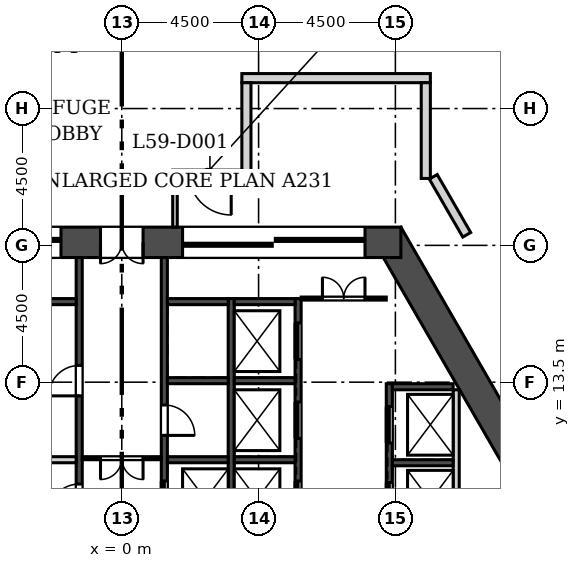
"""IFC4 building model, lengths in metres.
Left out: names, types, materials, properties, quantities, classifications, styles, units other than length and angle.
Written with IfcOpenShell. Run it as: python <this file> out.ifc"""

import sys

from ifc_helpers import new_model, si_unit, direction, frame, frame_2d, origin, place, context, subcontext, project, spatial, rectangle, extrude, element, fill, save


model = new_model("IFC4")
c1 = context("Model", 3, precision=1e-05, world=origin(), true_north=direction((0.0, 1.0)))
c2 = subcontext(c1, "Body", "Model", "MODEL_VIEW")
j1 = project(units=[si_unit("LENGTHUNIT", "METRE"), si_unit("PLANEANGLEUNIT", "RADIAN")], contexts=[c1])
p1 = place(None, origin())
s1 = spatial("IfcSite", under=j1, at=p1, CompositionType="ELEMENT")
p2 = place(p1, origin())
s2 = spatial("IfcBuilding", under=s1, at=p2, CompositionType="ELEMENT")
p3 = place(p2, frame((0.0, 0.0, 259.5)))
s3 = spatial("IfcBuildingStorey", under=s2, at=p3, CompositionType="ELEMENT", Elevation=259.5)
p4 = place(p3, frame((13.167, 10.695, 0.0), z_axis=(0.0, 0.0, 1.0), x_axis=(-0.499995021168, 0.866028278295, 0.0)))
e1 = element("IfcWall", 1, at=p4, inside=s3, PredefinedType="SHEAR", context=c2, shape_type="SweptSolid", body=[
    extrude(rectangle(XDim=8.839, YDim=1.0, at=frame_2d((4.419, 0.0))), origin(), (0.0, 0.0, 1.0), 7.2),
])
p5 = place(p3, frame((9.181, 18.1, 0.0), z_axis=(0.0, 0.0, 1.0), x_axis=(-1.0, 0.0, 0.0)))
e2 = element("IfcWall", 2, at=p5, inside=s3, PredefinedType="SHEAR", context=c2, shape_type="SweptSolid", body=[
    extrude(rectangle(XDim=18.361, YDim=1.0, at=frame_2d((9.181, 0.0))), origin(), (0.0, 0.0, 1.0), 7.2),
])
p6 = place(p5, frame((8.481, 0.0, 0.0)))
e3 = element("IfcOpeningElement", 3, at=p6, cuts=e2, PredefinedType="OPENING", context=c2, shape_type="SweptSolid", body=[
    extrude(rectangle(XDim=1.4, YDim=2.1, at=frame_2d((0.7, 1.05))), frame((0.0, 0.51, 0.0), z_axis=(0.0, -1.0, 0.0), x_axis=(1.0, 0.0, 0.0)), (0.0, 0.0, 1.0), 1.02),
])
p7 = place(p5, frame((11.181, 0.0, 0.0)))
e4 = element("IfcOpeningElement", 4, at=p7, cuts=e2, PredefinedType="OPENING", context=c2, shape_type="SweptSolid", body=[
    extrude(rectangle(XDim=6.0, YDim=2.4, at=frame_2d((3.0, 1.2))), frame((0.0, 0.51, 0.0), z_axis=(0.0, -1.0, 0.0), x_axis=(1.0, 0.0, 0.0)), (0.0, 0.0, 1.0), 1.02),
])
p8 = place(p5, frame((1.181, 0.0, 0.0)))
e5 = element("IfcOpeningElement", 5, at=p8, cuts=e2, PredefinedType="OPENING", context=c2, shape_type="SweptSolid", body=[
    extrude(rectangle(XDim=6.0, YDim=2.4, at=frame_2d((3.0, 1.2))), frame((0.0, 0.51, 0.0), z_axis=(0.0, -1.0, 0.0), x_axis=(1.0, 0.0, 0.0)), (0.0, 0.0, 1.0), 1.02),
])
p9 = place(p3, frame((26.022, 7.709, 0.0), z_axis=(0.0, 0.0, 1.0), x_axis=(-0.500000891752, 0.866024888931, 0.0)))
e6 = element("IfcWall", 6, at=p9, inside=s3, PredefinedType="SOLIDWALL", context=c2, shape_type="SweptSolid", body=[
    extrude(rectangle(XDim=43.339, YDim=0.34, at=frame_2d((21.669, 0.0))), origin(), (0.0, 0.0, 1.0), 6.8),
])
p10 = place(p9, frame((19.335, 0.0, 0.9)))
e7 = element("IfcOpeningElement", 7, at=p10, cuts=e6, PredefinedType="OPENING", context=c2, shape_type="SweptSolid", body=[
    extrude(rectangle(XDim=1.885, YDim=3.0, at=frame_2d((0.942, 1.5))), frame((0.0, 0.18, 0.0), z_axis=(0.0, -1.0, 0.0), x_axis=(1.0, 0.0, 0.0)), (0.0, 0.0, 1.0), 0.36),
])
p11 = place(p9, frame((34.335, 0.0, 0.9)))
e8 = element("IfcOpeningElement", 8, at=p11, cuts=e6, PredefinedType="OPENING", context=c2, shape_type="SweptSolid", body=[
    extrude(rectangle(XDim=1.885, YDim=3.0, at=frame_2d((0.942, 1.5))), frame((0.0, 0.18, 0.0), z_axis=(0.0, -1.0, 0.0), x_axis=(1.0, 0.0, 0.0)), (0.0, 0.0, 1.0), 0.36),
])
p12 = place(p9, frame((40.335, 0.0, 0.9)))
e9 = element("IfcOpeningElement", 9, at=p12, cuts=e6, PredefinedType="OPENING", context=c2, shape_type="SweptSolid", body=[
    extrude(rectangle(XDim=1.885, YDim=3.0, at=frame_2d((0.942, 1.5))), frame((0.0, 0.18, 0.0), z_axis=(0.0, -1.0, 0.0), x_axis=(1.0, 0.0, 0.0)), (0.0, 0.0, 1.0), 0.36),
])
p13 = place(p3, frame((11.0, 5.85, 0.0), z_axis=(0.0, 0.0, 1.0), x_axis=(0.0, 1.0, 0.0)))
e10 = element("IfcWall", 10, at=p13, inside=s3, PredefinedType="SOLIDWALL", context=c2, shape_type="SweptSolid", body=[
    extrude(rectangle(XDim=7.4, YDim=0.2, at=frame_2d((3.7, 0.0))), origin(), (0.0, 0.0, 1.0), 6.8),
])
p14 = place(p3, frame((8.8, 8.25, -0.4), z_axis=(0.0, 0.0, 1.0), x_axis=(0.0, 1.0, 0.0)))
e11 = element("IfcWall", 11, at=p14, inside=s3, PredefinedType="SOLIDWALL", context=c2, shape_type="SweptSolid", body=[
    extrude(rectangle(XDim=5.2, YDim=0.2, at=frame_2d((2.6, 0.0))), origin(), (0.0, 0.0, 1.0), 7.2),
])
p15 = place(p14, frame((0.75, 0.0, 0.4)))
e12 = element("IfcOpeningElement", 12, at=p15, cuts=e11, PredefinedType="OPENING", context=c2, shape_type="SweptSolid", body=[
    extrude(rectangle(XDim=1.2, YDim=2.1, at=frame_2d((0.6, 1.05))), frame((0.0, 0.11, 0.0), z_axis=(0.0, -1.0, 0.0), x_axis=(1.0, 0.0, 0.0)), (0.0, 0.0, 1.0), 0.22),
])
p16 = place(p14, frame((3.25, 0.0, 0.4)))
e13 = element("IfcOpeningElement", 13, at=p16, cuts=e11, PredefinedType="OPENING", context=c2, shape_type="SweptSolid", body=[
    extrude(rectangle(XDim=1.2, YDim=2.1, at=frame_2d((0.6, 1.05))), frame((0.0, 0.11, 0.0), z_axis=(0.0, -1.0, 0.0), x_axis=(1.0, 0.0, 0.0)), (0.0, 0.0, 1.0), 0.22),
])
p17 = place(p3, frame((5.8, 8.25, -0.4), z_axis=(0.0, 0.0, 1.0), x_axis=(0.0, 1.0, 0.0)))
e14 = element("IfcWall", 14, at=p17, inside=s3, PredefinedType="SOLIDWALL", context=c2, shape_type="SweptSolid", body=[
    extrude(rectangle(XDim=8.0, YDim=0.2, at=frame_2d((4.0, 0.0))), origin(), (0.0, 0.0, 1.0), 7.2),
])
p18 = place(p17, frame((0.8, 0.0, 0.4)))
e15 = element("IfcOpeningElement", 15, at=p18, cuts=e14, PredefinedType="OPENING", context=c2, shape_type="SweptSolid", body=[
    extrude(rectangle(XDim=1.2, YDim=2.1, at=frame_2d((0.6, 1.05))), frame((0.0, 0.11, 0.0), z_axis=(0.0, -1.0, 0.0), x_axis=(1.0, 0.0, 0.0)), (0.0, 0.0, 1.0), 0.22),
])
p19 = place(p17, frame((3.4, 0.0, 0.4)))
e16 = element("IfcOpeningElement", 16, at=p19, cuts=e14, PredefinedType="OPENING", context=c2, shape_type="SweptSolid", body=[
    extrude(rectangle(XDim=1.2, YDim=2.1, at=frame_2d((0.6, 1.05))), frame((0.0, 0.11, 0.0), z_axis=(0.0, -1.0, 0.0), x_axis=(1.0, 0.0, 0.0)), (0.0, 0.0, 1.0), 0.22),
])
p20 = place(p17, frame((6.0, 0.0, 0.4)))
e17 = element("IfcOpeningElement", 17, at=p20, cuts=e14, PredefinedType="OPENING", context=c2, shape_type="SweptSolid", body=[
    extrude(rectangle(XDim=1.2, YDim=2.1, at=frame_2d((0.6, 1.05))), frame((0.0, 0.11, 0.0), z_axis=(0.0, -1.0, 0.0), x_axis=(1.0, 0.0, 0.0)), (0.0, 0.0, 1.0), 0.22),
])
p21 = place(p3, frame((3.6, 8.45, -0.4), z_axis=(0.0, 0.0, 1.0), x_axis=(0.0, 1.0, 0.0)))
e18 = element("IfcWall", 18, at=p21, inside=s3, PredefinedType="SOLIDWALL", context=c2, shape_type="SweptSolid", body=[
    extrude(rectangle(XDim=7.8, YDim=0.2, at=frame_2d((3.9, 0.0))), origin(), (0.0, 0.0, 1.0), 7.2),
])
p22 = place(p3, frame((-1.4, 5.85, -0.4), z_axis=(0.0, 0.0, 1.0), x_axis=(0.0, 1.0, 0.0)))
e19 = element("IfcWall", 19, at=p22, inside=s3, PredefinedType="SOLIDWALL", context=c2, shape_type="SweptSolid", body=[
    extrude(rectangle(XDim=11.75, YDim=0.2, at=frame_2d((5.875, 0.0))), origin(), (0.0, 0.0, 1.0), 7.2),
])
p23 = place(p22, frame((0.65, 0.0, 0.4)))
e20 = element("IfcOpeningElement", 20, at=p23, cuts=e19, PredefinedType="OPENING", context=c2, shape_type="SweptSolid", body=[
    extrude(rectangle(XDim=1.1, YDim=2.1, at=frame_2d((0.55, 1.05))), frame((0.0, 0.11, 0.0), z_axis=(0.0, -1.0, 0.0), x_axis=(1.0, 0.0, 0.0)), (0.0, 0.0, 1.0), 0.22),
])
p24 = place(p22, frame((3.3, 0.0, 0.4)))
e21 = element("IfcOpeningElement", 21, at=p24, cuts=e19, PredefinedType="OPENING", context=c2, shape_type="SweptSolid", body=[
    extrude(rectangle(XDim=1.0, YDim=2.1, at=frame_2d((0.5, 1.05))), frame((0.0, 0.11, 0.0), z_axis=(0.0, -1.0, 0.0), x_axis=(1.0, 0.0, 0.0)), (0.0, 0.0, 1.0), 0.22),
])
p25 = place(p22, frame((7.2, 0.0, 0.4)))
e22 = element("IfcOpeningElement", 22, at=p25, cuts=e19, PredefinedType="OPENING", context=c2, shape_type="SweptSolid", body=[
    extrude(rectangle(XDim=1.0, YDim=2.1, at=frame_2d((0.5, 1.05))), frame((0.0, 0.11, 0.0), z_axis=(0.0, -1.0, 0.0), x_axis=(1.0, 0.0, 0.0)), (0.0, 0.0, 1.0), 0.22),
])
p26 = place(p3, frame((1.4, 5.85, -0.4), z_axis=(0.0, 0.0, 1.0), x_axis=(0.0, 1.0, 0.0)))
e23 = element("IfcWall", 23, at=p26, inside=s3, PredefinedType="SOLIDWALL", context=c2, shape_type="SweptSolid", body=[
    extrude(rectangle(XDim=11.75, YDim=0.2, at=frame_2d((5.875, 0.0))), origin(), (0.0, 0.0, 1.0), 7.2),
])
p27 = place(p26, frame((3.2, 0.0, 0.4)))
e24 = element("IfcOpeningElement", 24, at=p27, cuts=e23, PredefinedType="OPENING", context=c2, shape_type="SweptSolid", body=[
    extrude(rectangle(XDim=1.2, YDim=2.1, at=frame_2d((0.6, 1.05))), frame((0.0, 0.11, 0.0), z_axis=(0.0, -1.0, 0.0), x_axis=(1.0, 0.0, 0.0)), (0.0, 0.0, 1.0), 0.22),
])
p28 = place(p26, frame((0.65, 0.0, 0.4)))
e25 = element("IfcOpeningElement", 25, at=p28, cuts=e23, PredefinedType="OPENING", context=c2, shape_type="SweptSolid", body=[
    extrude(rectangle(XDim=1.1, YDim=2.1, at=frame_2d((0.55, 1.05))), frame((0.0, 0.11, 0.0), z_axis=(0.0, -1.0, 0.0), x_axis=(1.0, 0.0, 0.0)), (0.0, 0.0, 1.0), 0.22),
])
p29 = place(p26, frame((5.9, 0.0, 0.4)))
e26 = element("IfcOpeningElement", 26, at=p29, cuts=e23, PredefinedType="OPENING", context=c2, shape_type="SweptSolid", body=[
    extrude(rectangle(XDim=1.0, YDim=2.1, at=frame_2d((0.5, 1.05))), frame((0.0, 0.11, 0.0), z_axis=(0.0, -1.0, 0.0), x_axis=(1.0, 0.0, 0.0)), (0.0, 0.0, 1.0), 0.22),
])
p30 = place(p3, frame((-3.5, 10.95, 0.0), z_axis=(0.0, 0.0, 1.0), x_axis=(1.0, 0.0, 0.0)))
e27 = element("IfcWall", 27, at=p30, inside=s3, PredefinedType="SOLIDWALL", context=c2, shape_type="SweptSolid", body=[
    extrude(rectangle(XDim=2.0, YDim=0.2, at=frame_2d((1.0, 0.0))), origin(), (0.0, 0.0, 1.0), 6.8),
])
for number, where, z_axis, x_axis in (
    (28, (-3.5, 16.15, -0.4), (0.0, 0.0, 1.0), (1.0, 0.0, 0.0)),
    (29, (8.9, 10.85, -0.4), (0.0, 0.0, 1.0), (1.0, 0.0, 0.0)),
    (30, (8.9, 13.35, -0.4), (0.0, 0.0, 1.0), (1.0, 0.0, 0.0)),
    (31, (3.7, 10.95, -0.4), (0.0, 0.0, 1.0), (1.0, 0.0, 0.0)),
    (32, (3.7, 13.55, -0.4), (0.0, 0.0, 1.0), (1.0, 0.0, 0.0)),
    (33, (3.7, 16.15, -0.4), (0.0, 0.0, 1.0), (1.0, 0.0, 0.0)),
    (34, (1.5, 10.95, -0.4), (0.0, 0.0, 1.0), (1.0, 0.0, 0.0)),
    (35, (1.5, 13.55, -0.4), (0.0, 0.0, 1.0), (1.0, 0.0, 0.0)),
    (36, (1.5, 16.15, -0.4), (0.0, 0.0, 1.0), (1.0, 0.0, 0.0)),
):
    element("IfcWall", number, at=place(p3, frame(where, z_axis=z_axis, x_axis=x_axis)), inside=s3, PredefinedType="SOLIDWALL", context=c2, shape_type="SweptSolid", body=[
        extrude(rectangle(XDim=2.0, YDim=0.2, at=frame_2d((1.0, 0.0))), origin(), (0.0, 0.0, 1.0), 7.2),
    ])
p31 = place(p3, frame((5.9, 16.25, 0.0), z_axis=(0.0, 0.0, 1.0), x_axis=(1.0, 0.0, 0.0)))
e37 = element("IfcWall", 37, at=p31, inside=s3, PredefinedType="PARTITIONING", context=c2, shape_type="SweptSolid", body=[
    extrude(rectangle(XDim=2.8, YDim=0.1, at=frame_2d((1.4, 0.0))), origin(), (0.0, 0.0, 1.0), 6.8),
])
p32 = place(p31, frame((0.7, 0.0, 0.0)))
e38 = element("IfcOpeningElement", 38, at=p32, cuts=e37, PredefinedType="OPENING", context=c2, shape_type="SweptSolid", body=[
    extrude(rectangle(XDim=1.4, YDim=2.1, at=frame_2d((0.7, 1.05))), frame((0.0, 0.06, 0.0), z_axis=(0.0, -1.0, 0.0), x_axis=(1.0, 0.0, 0.0)), (0.0, 0.0, 1.0), 0.12),
])
p33 = place(p3, frame((-1.3, 11.0, 0.0), z_axis=(0.0, 0.0, 1.0), x_axis=(1.0, 0.0, 0.0)))
e39 = element("IfcWall", 39, at=p33, inside=s3, PredefinedType="PARTITIONING", context=c2, shape_type="SweptSolid", body=[
    extrude(rectangle(XDim=2.6, YDim=0.1, at=frame_2d((1.3, 0.0))), origin(), (0.0, 0.0, 1.0), 6.8),
])
p34 = place(p33, frame((0.6, 0.0, 0.0)))
e40 = element("IfcOpeningElement", 40, at=p34, cuts=e39, PredefinedType="OPENING", context=c2, shape_type="SweptSolid", body=[
    extrude(rectangle(XDim=1.4, YDim=2.1, at=frame_2d((0.7, 1.05))), frame((0.0, 0.06, 0.0), z_axis=(0.0, -1.0, 0.0), x_axis=(1.0, 0.0, 0.0)), (0.0, 0.0, 1.0), 0.12),
])
p35 = place(p3, frame((3.95, 23.5, 0.0), z_axis=(0.0, 0.0, 1.0), x_axis=(1.0, 0.0, 0.0)))
e41 = element("IfcWall", 41, at=p35, inside=s3, PredefinedType="SOLIDWALL", context=c2, shape_type="SweptSolid", body=[
    extrude(rectangle(XDim=6.2, YDim=0.3, at=frame_2d((3.1, 0.0))), origin(), (0.0, 0.0, 1.0), 6.8),
])
p36 = place(p3, frame((4.1, 20.2, 0.0), z_axis=(0.0, 0.0, 1.0), x_axis=(7.7513371e-05, 0.999999996996, 0.0)))
e42 = element("IfcWall", 42, at=p36, inside=s3, PredefinedType="SOLIDWALL", context=c2, shape_type="SweptSolid", body=[
    extrude(rectangle(XDim=3.15, YDim=0.3, at=frame_2d((1.575, 0.0))), origin(), (0.0, 0.0, 1.0), 6.8),
])
p37 = place(p3, frame((10.0, 23.35, 0.0), z_axis=(0.0, 0.0, 1.0), x_axis=(0.0, -1.0, 0.0)))
e43 = element("IfcWall", 43, at=p37, inside=s3, PredefinedType="SOLIDWALL", context=c2, shape_type="SweptSolid", body=[
    extrude(rectangle(XDim=3.149, YDim=0.3, at=frame_2d((1.575, 0.0))), origin(), (0.0, 0.0, 1.0), 6.8),
])
p38 = place(p3, frame((1.675, 20.4, 0.0), z_axis=(0.0, 0.0, 1.0), x_axis=(1.0, 0.0, 0.0)))
e44 = element("IfcWall", 44, at=p38, inside=s3, PredefinedType="PARTITIONING", context=c2, shape_type="SweptSolid", body=[
    extrude(rectangle(XDim=2.275, YDim=0.15, at=frame_2d((1.137, 0.0))), origin(), (0.0, 0.0, 1.0), 6.8),
])
p39 = place(p38, frame((0.524, 0.0, 0.0)))
e45 = element("IfcOpeningElement", 45, at=p39, cuts=e44, PredefinedType="OPENING", context=c2, shape_type="SweptSolid", body=[
    extrude(rectangle(XDim=1.4, YDim=2.1, at=frame_2d((0.7, 1.05))), frame((0.0, 0.085, 0.0), z_axis=(0.0, -1.0, 0.0), x_axis=(1.0, 0.0, 0.0)), (0.0, 0.0, 1.0), 0.17),
])
p40 = place(p3, frame((10.246, 20.255, 0.0), z_axis=(0.0, 0.0, 1.0), x_axis=(0.500026363189, -0.866010182455, 0.0)))
e46 = element("IfcWall", 46, at=p40, inside=s3, PredefinedType="SOLIDWALL", context=c2, shape_type="SweptSolid", body=[
    extrude(rectangle(XDim=2.202, YDim=0.3, at=frame_2d((1.101, 0.0))), origin(), (0.0, 0.0, 1.0), 6.8),
])
p41 = place(p3, frame((1.75, 18.6, 0.0), z_axis=(0.0, 0.0, 1.0), x_axis=(0.0, 1.0, 0.0)))
e47 = element("IfcWall", 47, at=p41, inside=s3, PredefinedType="PARTITIONING", context=c2, shape_type="SweptSolid", body=[
    extrude(rectangle(XDim=1.725, YDim=0.15, at=frame_2d((0.862, 0.0))), origin(), (0.0, 0.0, 1.0), 6.8),
])
p42 = place(p15, origin())
e48 = element("IfcDoor", 48, at=p42, inside=s3, OperationType="SLIDING_TO_LEFT", PredefinedType="DOOR", context=c2, shape_type="SweptSolid", body=[
    extrude(rectangle(XDim=1.2, YDim=2.1, at=frame_2d((0.6, 1.05))), frame((0.0, 0.025, 0.0), z_axis=(0.0, -1.0, 0.0), x_axis=(1.0, 0.0, 0.0)), (0.0, 0.0, 1.0), 0.05),
])
fill(e12, e48)
p43 = place(p16, origin())
e49 = element("IfcDoor", 49, at=p43, inside=s3, OperationType="SLIDING_TO_LEFT", PredefinedType="DOOR", context=c2, shape_type="SweptSolid", body=[
    extrude(rectangle(XDim=1.2, YDim=2.1, at=frame_2d((0.6, 1.05))), frame((0.0, 0.025, 0.0), z_axis=(0.0, -1.0, 0.0), x_axis=(1.0, 0.0, 0.0)), (0.0, 0.0, 1.0), 0.05),
])
fill(e13, e49)
p44 = place(p18, origin())
e50 = element("IfcDoor", 50, at=p44, inside=s3, OperationType="SLIDING_TO_LEFT", PredefinedType="DOOR", context=c2, shape_type="SweptSolid", body=[
    extrude(rectangle(XDim=1.2, YDim=2.1, at=frame_2d((0.6, 1.05))), frame((0.0, 0.025, 0.0), z_axis=(0.0, -1.0, 0.0), x_axis=(1.0, 0.0, 0.0)), (0.0, 0.0, 1.0), 0.05),
])
fill(e15, e50)
p45 = place(p19, origin())
e51 = element("IfcDoor", 51, at=p45, inside=s3, OperationType="SLIDING_TO_LEFT", PredefinedType="DOOR", context=c2, shape_type="SweptSolid", body=[
    extrude(rectangle(XDim=1.2, YDim=2.1, at=frame_2d((0.6, 1.05))), frame((0.0, 0.025, 0.0), z_axis=(0.0, -1.0, 0.0), x_axis=(1.0, 0.0, 0.0)), (0.0, 0.0, 1.0), 0.05),
])
fill(e16, e51)
p46 = place(p20, origin())
e52 = element("IfcDoor", 52, at=p46, inside=s3, OperationType="SLIDING_TO_LEFT", PredefinedType="DOOR", context=c2, shape_type="SweptSolid", body=[
    extrude(rectangle(XDim=1.2, YDim=2.1, at=frame_2d((0.6, 1.05))), frame((0.0, 0.025, 0.0), z_axis=(0.0, -1.0, 0.0), x_axis=(1.0, 0.0, 0.0)), (0.0, 0.0, 1.0), 0.05),
])
fill(e17, e52)
p47 = place(p27, origin())
e53 = element("IfcDoor", 53, at=p47, inside=s3, OperationType="SLIDING_TO_LEFT", PredefinedType="DOOR", context=c2, shape_type="SweptSolid", body=[
    extrude(rectangle(XDim=1.2, YDim=2.1, at=frame_2d((0.6, 1.05))), frame((0.0, 0.025, 0.0), z_axis=(0.0, -1.0, 0.0), x_axis=(1.0, 0.0, 0.0)), (0.0, 0.0, 1.0), 0.05),
])
fill(e24, e53)
p48 = place(p24, origin())
e54 = element("IfcDoor", 54, at=p48, inside=s3, OperationType="SINGLE_SWING_LEFT", PredefinedType="DOOR", context=c2, shape_type="SweptSolid", body=[
    extrude(rectangle(XDim=1.0, YDim=2.1, at=frame_2d((0.5, 1.05))), frame((0.0, 0.025, 0.0), z_axis=(0.0, -1.0, 0.0), x_axis=(1.0, 0.0, 0.0)), (0.0, 0.0, 1.0), 0.05),
])
fill(e21, e54)
p49 = place(p25, origin())
e55 = element("IfcDoor", 55, at=p49, inside=s3, OperationType="SINGLE_SWING_LEFT", PredefinedType="DOOR", context=c2, shape_type="SweptSolid", body=[
    extrude(rectangle(XDim=1.0, YDim=2.1, at=frame_2d((0.5, 1.05))), frame((0.0, 0.025, 0.0), z_axis=(0.0, -1.0, 0.0), x_axis=(1.0, 0.0, 0.0)), (0.0, 0.0, 1.0), 0.05),
])
fill(e22, e55)
p50 = place(p29, frame((1.0, 0.0, 0.0), z_axis=(0.0, 0.0, 1.0), x_axis=(-1.0, 0.0, 0.0)))
e56 = element("IfcDoor", 56, at=p50, inside=s3, OperationType="SINGLE_SWING_RIGHT", PredefinedType="DOOR", context=c2, shape_type="SweptSolid", body=[
    extrude(rectangle(XDim=1.0, YDim=2.1, at=frame_2d((0.5, 1.05))), frame((0.0, 0.025, 0.0), z_axis=(0.0, -1.0, 0.0), x_axis=(1.0, 0.0, 0.0)), (0.0, 0.0, 1.0), 0.05),
])
fill(e26, e56)
p51 = place(p32, origin())
e57 = element("IfcDoor", 57, at=p51, inside=s3, OperationType="DOUBLE_DOOR_SINGLE_SWING", PredefinedType="DOOR", context=c2, shape_type="SweptSolid", body=[
    extrude(rectangle(XDim=1.4, YDim=2.1, at=frame_2d((0.7, 1.05))), frame((0.0, 0.025, 0.0), z_axis=(0.0, -1.0, 0.0), x_axis=(1.0, 0.0, 0.0)), (0.0, 0.0, 1.0), 0.05),
])
fill(e38, e57)
p52 = place(p34, frame((1.4, 0.0, 0.0), z_axis=(0.0, 0.0, 1.0), x_axis=(-1.0, 0.0, 0.0)))
e58 = element("IfcDoor", 58, at=p52, inside=s3, OperationType="DOUBLE_DOOR_SINGLE_SWING", PredefinedType="DOOR", context=c2, shape_type="SweptSolid", body=[
    extrude(rectangle(XDim=1.4, YDim=2.1, at=frame_2d((0.7, 1.05))), frame((0.0, 0.025, 0.0), z_axis=(0.0, -1.0, 0.0), x_axis=(1.0, 0.0, 0.0)), (0.0, 0.0, 1.0), 0.05),
])
fill(e40, e58)
p53 = place(p6, origin())
e59 = element("IfcDoor", 59, at=p53, inside=s3, OperationType="DOUBLE_DOOR_SINGLE_SWING", PredefinedType="DOOR", context=c2, shape_type="SweptSolid", body=[
    extrude(rectangle(XDim=1.4, YDim=2.1, at=frame_2d((0.7, 1.05))), frame((0.0, 0.025, 0.0), z_axis=(0.0, -1.0, 0.0), x_axis=(1.0, 0.0, 0.0)), (0.0, 0.0, 1.0), 0.05),
])
fill(e3, e59)
p54 = place(p7, origin())
e60 = element("IfcDoor", 60, at=p54, inside=s3, OperationType="DOUBLE_DOOR_SLIDING", PredefinedType="DOOR", context=c2, shape_type="SweptSolid", body=[
    extrude(rectangle(XDim=6.0, YDim=2.4, at=frame_2d((3.0, 1.2))), frame((0.0, 0.025, 0.0), z_axis=(0.0, -1.0, 0.0), x_axis=(1.0, 0.0, 0.0)), (0.0, 0.0, 1.0), 0.05),
])
fill(e4, e60)
p55 = place(p8, origin())
e61 = element("IfcDoor", 61, at=p55, inside=s3, OperationType="DOUBLE_DOOR_SLIDING", PredefinedType="DOOR", context=c2, shape_type="SweptSolid", body=[
    extrude(rectangle(XDim=6.0, YDim=2.4, at=frame_2d((3.0, 1.2))), frame((0.0, 0.025, 0.0), z_axis=(0.0, -1.0, 0.0), x_axis=(1.0, 0.0, 0.0)), (0.0, 0.0, 1.0), 0.05),
])
fill(e5, e61)
p56 = place(p39, frame((1.4, 0.0, 0.0), z_axis=(0.0, 0.0, 1.0), x_axis=(-1.0, 0.0, 0.0)))
e62 = element("IfcDoor", 62, at=p56, inside=s3, OperationType="SINGLE_SWING_LEFT", PredefinedType="DOOR", context=c2, shape_type="SweptSolid", body=[
    extrude(rectangle(XDim=1.4, YDim=2.1, at=frame_2d((0.7, 1.05))), frame((0.0, 0.025, 0.0), z_axis=(0.0, -1.0, 0.0), x_axis=(1.0, 0.0, 0.0)), (0.0, 0.0, 1.0), 0.05),
])
fill(e45, e62)
save(model, sys.argv[1])
